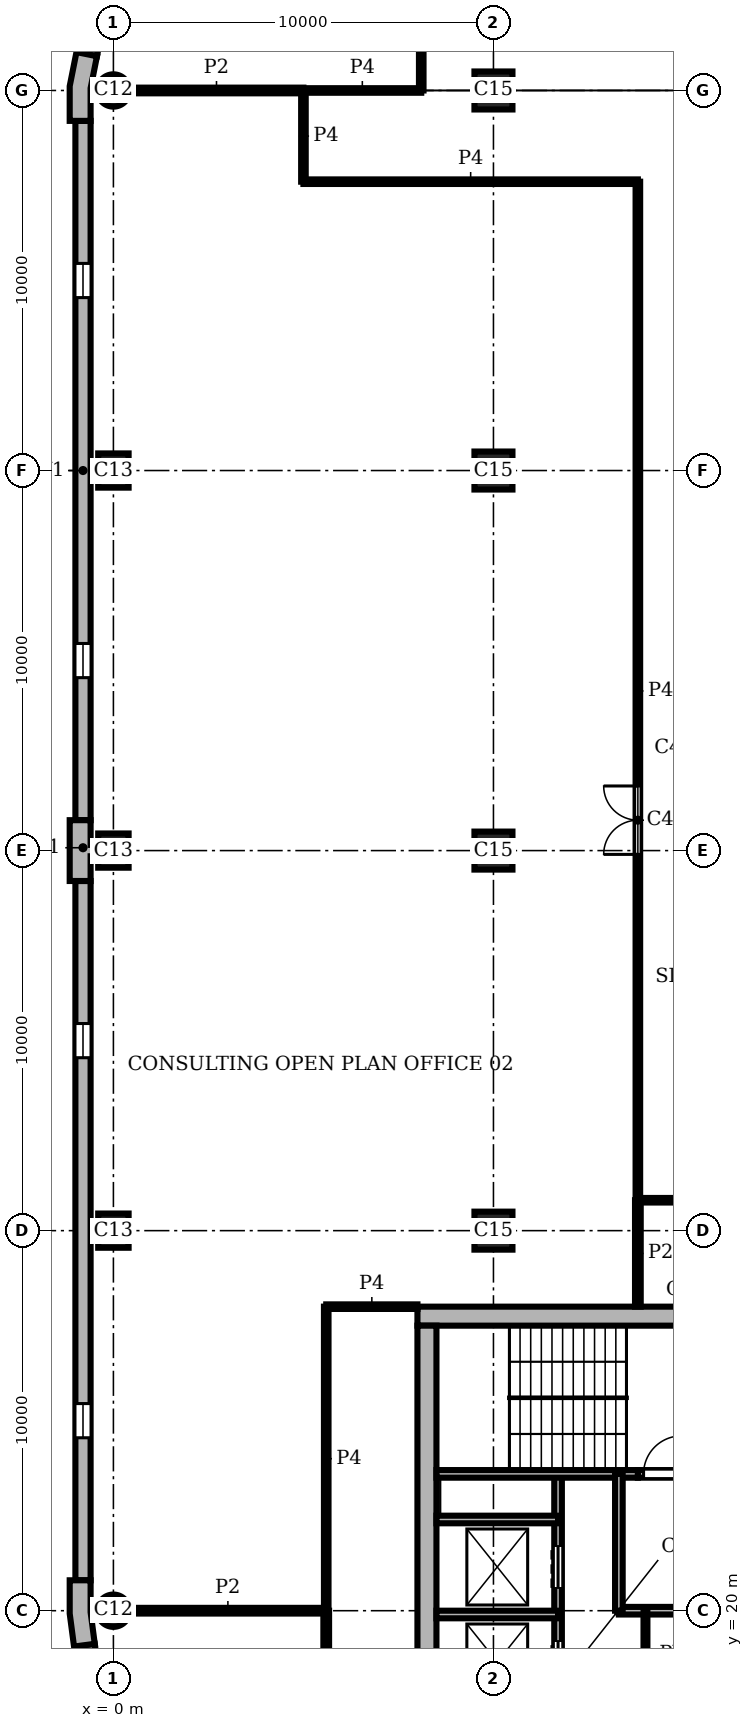
"""IFC4 building model, lengths in metres.
Left out: names, types, materials, properties, quantities, classifications, styles, units other than length and angle.
Written with IfcOpenShell. Run it as: python <this file> out.ifc"""

import sys

from ifc_helpers import new_model, si_unit, direction, frame, frame_2d, origin, origin_2d, place, context, subcontext, project, spatial, polyline, rectangle, circle, outline, extrude, element, fill, save


model = new_model("IFC4")
c1 = context("Model", 3, precision=1e-05, world=origin(), true_north=direction((0.0, 1.0)))
c2 = subcontext(c1, "Body", "Model", "MODEL_VIEW")
j1 = project(units=[si_unit("LENGTHUNIT", "METRE"), si_unit("PLANEANGLEUNIT", "RADIAN")], contexts=[c1])
p1 = place(None, origin())
s1 = spatial("IfcSite", under=j1, at=p1, CompositionType="ELEMENT")
p2 = place(p1, origin())
s2 = spatial("IfcBuilding", under=s1, at=p2, CompositionType="ELEMENT")
p3 = place(p2, frame((0.0, 0.0, 282.6)))
s3 = spatial("IfcBuildingStorey", under=s2, at=p3, CompositionType="ELEMENT", Elevation=282.6)
p4 = place(p3, frame((0.0, 60.0, 0.0), z_axis=(0.0, 0.0, 1.0), x_axis=(1.0, 0.0, 0.0)))
e1 = element("IfcColumn", 1, at=p4, inside=s3, PredefinedType="COLUMN", context=c2, shape_type="SweptSolid", body=[
    extrude(circle(Radius=0.425, at=origin_2d()), origin(), (0.0, 0.0, 1.0), 3.9),
])
for number, where, z_axis, x_axis in (
    (2, (0.0, 50.0, 0.0), (0.0, 0.0, 1.0), (0.0, 1.0, 0.0)),
    (3, (0.0, 40.0, 0.0), (0.0, 0.0, 1.0), (0.0, 1.0, 0.0)),
    (4, (0.0, 30.0, 0.0), (0.0, 0.0, 1.0), (0.0, 1.0, 0.0)),
):
    element("IfcColumn", number, at=place(p3, frame(where, z_axis=z_axis, x_axis=x_axis)), inside=s3, PredefinedType="COLUMN", context=c2, shape_type="SweptSolid", body=[
        extrude(rectangle(XDim=0.9, YDim=0.8, at=origin_2d()), origin(), (0.0, 0.0, 1.0), 3.9),
    ])
p5 = place(p3, frame((0.0, 20.0, 0.0), z_axis=(0.0, 0.0, 1.0), x_axis=(1.0, 0.0, 0.0)))
e5 = element("IfcColumn", 5, at=p5, inside=s3, PredefinedType="COLUMN", context=c2, shape_type="SweptSolid", body=[
    extrude(circle(Radius=0.425, at=origin_2d()), origin(), (0.0, 0.0, 1.0), 3.9),
])
for number, where, z_axis, x_axis in (
    (6, (10.0, 30.0, 0.0), (0.0, 0.0, 1.0), (1.0, 0.0, 0.0)),
    (7, (10.0, 40.0, 0.0), (0.0, 0.0, 1.0), (1.0, 0.0, 0.0)),
    (8, (10.0, 50.0, 0.0), (0.0, 0.0, 1.0), (1.0, 0.0, 0.0)),
    (9, (10.0, 60.0, 0.0), (0.0, 0.0, 1.0), (1.0, 0.0, 0.0)),
):
    element("IfcColumn", number, at=place(p3, frame(where, z_axis=z_axis, x_axis=x_axis)), inside=s3, PredefinedType="COLUMN", context=c2, shape_type="SweptSolid", body=[
        extrude(rectangle(XDim=1.0, YDim=1.0, at=origin_2d()), origin(), (0.0, 0.0, 1.0), 3.9),
    ])
p6 = place(p3, frame((28.0, 27.75, 0.0), z_axis=(0.0, 0.0, 1.0), x_axis=(-1.0, 0.0, 0.0)))
e10 = element("IfcWall", 10, at=p6, inside=s3, PredefinedType="SHEAR", context=c2, shape_type="SweptSolid", body=[
    extrude(rectangle(XDim=20.0, YDim=0.5, at=frame_2d((10.0, 0.0))), origin(), (0.0, 0.0, 1.0), 3.9),
])
p7 = place(p3, frame((8.25, 27.5, 0.0), z_axis=(0.0, 0.0, 1.0), x_axis=(0.0, -1.0, 0.0)))
e11 = element("IfcWall", 11, at=p7, inside=s3, PredefinedType="SHEAR", context=c2, shape_type="SweptSolid", body=[
    extrude(rectangle(XDim=19.0, YDim=0.5, at=frame_2d((9.5, 0.0))), origin(), (0.0, 0.0, 1.0), 3.9),
])
p8 = place(p3, origin())
e12 = element("IfcWall", 12, at=p8, inside=s3, PredefinedType="SOLIDWALL", context=c2, shape_type="SweptSolid", body=[
    extrude(outline(polyline([(-0.825, 60.98), (-0.972, 61.009), (-1.15, 60.113), (-1.15, 59.2), (-1.0, 59.2), (-0.6, 59.2), (-0.6, 60.059), (-0.432, 60.902), (-0.825, 60.98)])), origin(), (0.0, 0.0, 1.0), 3.9),
])
e13 = element("IfcWall", 13, at=p8, inside=s3, PredefinedType="SOLIDWALL", context=c2, shape_type="SweptSolid", body=[
    extrude(outline(polyline([(-0.6, 39.2), (-0.6, 39.85), (-0.45, 39.85), (-0.45, 40.15), (-0.6, 40.15), (-0.6, 40.8), (-1.0, 40.8), (-1.15, 40.8), (-1.15, 40.0), (-1.15, 39.2), (-1.0, 39.2), (-0.6, 39.2)])), origin(), (0.0, 0.0, 1.0), 3.9),
])
e14 = element("IfcWall", 14, at=p8, inside=s3, PredefinedType="SOLIDWALL", context=c2, shape_type="SweptSolid", body=[
    extrude(outline(polyline([(-1.0, 20.8), (-1.15, 20.8), (-1.15, 19.925), (-1.036, 19.057), (-0.887, 19.076), (-0.49, 19.128), (-0.6, 19.961), (-0.6, 20.8), (-1.0, 20.8)])), origin(), (0.0, 0.0, 1.0), 3.9),
])
p9 = place(p3, frame((0.299, 65.602, 0.0), z_axis=(0.0, 0.0, 1.0), x_axis=(-0.195098533057, -0.98078364709, 0.0)))
e15 = element("IfcWall", 15, at=p9, inside=s3, PredefinedType="SOLIDWALL", context=c2, shape_type="SweptSolid", body=[
    extrude(rectangle(XDim=4.753, YDim=0.4, at=frame_2d((2.376, 0.0))), origin(), (0.0, 0.0, 1.0), 3.9),
])
p10 = place(p9, frame((0.226, 0.0, 0.9)))
e16 = element("IfcOpeningElement", 16, at=p10, cuts=e15, PredefinedType="OPENING", context=c2, shape_type="SweptSolid", body=[
    extrude(rectangle(XDim=4.3, YDim=2.35, at=frame_2d((2.15, 1.175))), frame((0.0, 0.21, 0.0), z_axis=(0.0, -1.0, 0.0), x_axis=(1.0, 0.0, 0.0)), (0.0, 0.0, 1.0), 0.42),
])
p11 = place(p3, frame((-0.8, 59.2, 0.0), z_axis=(0.0, 0.0, 1.0), x_axis=(0.0, -1.0, 0.0)))
e17 = element("IfcWall", 17, at=p11, inside=s3, PredefinedType="SOLIDWALL", context=c2, shape_type="SweptSolid", body=[
    extrude(rectangle(XDim=18.4, YDim=0.4, at=frame_2d((9.2, 0.0))), origin(), (0.0, 0.0, 1.0), 3.9),
])
p12 = place(p11, frame((3.75, 0.0, 0.9)))
e18 = element("IfcOpeningElement", 18, at=p12, cuts=e17, PredefinedType="OPENING", context=c2, shape_type="SweptSolid", body=[
    extrude(rectangle(XDim=0.9, YDim=2.35, at=frame_2d((0.45, 1.175))), frame((0.0, 0.21, 0.0), z_axis=(0.0, -1.0, 0.0), x_axis=(1.0, 0.0, 0.0)), (0.0, 0.0, 1.0), 0.42),
])
p13 = place(p11, frame((13.75, 0.0, 0.9)))
e19 = element("IfcOpeningElement", 19, at=p13, cuts=e17, PredefinedType="OPENING", context=c2, shape_type="SweptSolid", body=[
    extrude(rectangle(XDim=0.9, YDim=2.35, at=frame_2d((0.45, 1.175))), frame((0.0, 0.21, 0.0), z_axis=(0.0, -1.0, 0.0), x_axis=(1.0, 0.0, 0.0)), (0.0, 0.0, 1.0), 0.42),
])
p14 = place(p3, frame((-0.8, 39.2, 0.0), z_axis=(0.0, 0.0, 1.0), x_axis=(0.0, -1.0, 0.0)))
e20 = element("IfcWall", 20, at=p14, inside=s3, PredefinedType="SOLIDWALL", context=c2, shape_type="SweptSolid", body=[
    extrude(rectangle(XDim=18.4, YDim=0.4, at=frame_2d((9.2, 0.0))), origin(), (0.0, 0.0, 1.0), 3.9),
])
p15 = place(p14, frame((3.75, 0.0, 0.9)))
e21 = element("IfcOpeningElement", 21, at=p15, cuts=e20, PredefinedType="OPENING", context=c2, shape_type="SweptSolid", body=[
    extrude(rectangle(XDim=0.9, YDim=2.35, at=frame_2d((0.45, 1.175))), frame((0.0, 0.21, 0.0), z_axis=(0.0, -1.0, 0.0), x_axis=(1.0, 0.0, 0.0)), (0.0, 0.0, 1.0), 0.42),
])
p16 = place(p14, frame((13.75, 0.0, 0.9)))
e22 = element("IfcOpeningElement", 22, at=p16, cuts=e20, PredefinedType="OPENING", context=c2, shape_type="SweptSolid", body=[
    extrude(rectangle(XDim=0.9, YDim=2.35, at=frame_2d((0.45, 1.175))), frame((0.0, 0.21, 0.0), z_axis=(0.0, -1.0, 0.0), x_axis=(1.0, 0.0, 0.0)), (0.0, 0.0, 1.0), 0.42),
])
p17 = place(p3, frame((-0.689, 19.102, 0.0), z_axis=(0.0, 0.0, 1.0), x_axis=(0.130514280502, -0.991446429508, 0.0)))
e23 = element("IfcWall", 23, at=p17, inside=s3, PredefinedType="SOLIDWALL", context=c2, shape_type="SweptSolid", body=[
    extrude(rectangle(XDim=4.121, YDim=0.4, at=frame_2d((2.061, 0.0))), origin(), (0.0, 0.0, 1.0), 3.9),
])
p18 = place(p17, frame((1.611, 0.0, 0.9)))
e24 = element("IfcOpeningElement", 24, at=p18, cuts=e23, PredefinedType="OPENING", context=c2, shape_type="SweptSolid", body=[
    extrude(rectangle(XDim=0.9, YDim=2.35, at=frame_2d((0.45, 1.175))), frame((0.0, 0.21, 0.0), z_axis=(0.0, -1.0, 0.0), x_axis=(1.0, 0.0, 0.0)), (0.0, 0.0, 1.0), 0.42),
])
p19 = place(p3, frame((8.5, 19.9, 0.0), z_axis=(0.0, 0.0, 1.0), x_axis=(1.0, 0.0, 0.0)))
e25 = element("IfcWall", 25, at=p19, inside=s3, PredefinedType="SHEAR", context=c2, shape_type="SweptSolid", body=[
    extrude(rectangle(XDim=3.2, YDim=0.2, at=frame_2d((1.6, 0.0))), origin(), (0.0, 0.0, 1.0), 3.58),
])
p20 = place(p3, frame((13.3, 20.0, 0.0), z_axis=(0.0, 0.0, 1.0), x_axis=(1.0, 0.0, 0.0)))
e26 = element("IfcWall", 26, at=p20, inside=s3, PredefinedType="SHEAR", context=c2, shape_type="SweptSolid", body=[
    extrude(rectangle(XDim=4.7, YDim=0.2, at=frame_2d((2.35, 0.0))), origin(), (0.0, 0.0, 1.0), 3.58),
])
p21 = place(p3, frame((8.5, 22.4, 0.0), z_axis=(0.0, 0.0, 1.0), x_axis=(1.0, 0.0, 0.0)))
e27 = element("IfcWall", 27, at=p21, inside=s3, PredefinedType="SHEAR", context=c2, shape_type="SweptSolid", body=[
    extrude(rectangle(XDim=3.2, YDim=0.2, at=frame_2d((1.6, 0.0))), origin(), (0.0, 0.0, 1.0), 3.58),
])
p22 = place(p3, frame((8.5, 23.6, 0.0), z_axis=(0.0, 0.0, 1.0), x_axis=(1.0, 0.0, 0.0)))
e28 = element("IfcWall", 28, at=p22, inside=s3, PredefinedType="SHEAR", context=c2, shape_type="SweptSolid", body=[
    extrude(rectangle(XDim=5.3, YDim=0.2, at=frame_2d((2.65, 0.0))), origin(), (0.0, 0.0, 1.0), 3.58),
])
p23 = place(p3, frame((13.8, 23.6, 0.0), z_axis=(0.0, 0.0, 1.0), x_axis=(1.0, 0.0, 0.0)))
e29 = element("IfcWall", 29, at=p23, inside=s3, PredefinedType="SHEAR", context=c2, shape_type="SweptSolid", body=[
    extrude(rectangle(XDim=13.7, YDim=0.2, at=frame_2d((6.85, 0.0))), origin(), (0.0, 0.0, 1.0), 3.58),
])
p24 = place(p23, frame((2.4, 0.0, 0.0)))
e30 = element("IfcOpeningElement", 30, at=p24, cuts=e29, PredefinedType="OPENING", context=c2, shape_type="SweptSolid", body=[
    extrude(rectangle(XDim=1.1, YDim=2.1, at=frame_2d((0.55, 1.05))), frame((0.0, 0.11, 0.0), z_axis=(0.0, -1.0, 0.0), x_axis=(1.0, 0.0, 0.0)), (0.0, 0.0, 1.0), 0.22),
])
p25 = place(p23, frame((4.9, 0.0, 0.0)))
e31 = element("IfcOpeningElement", 31, at=p25, cuts=e29, PredefinedType="OPENING", context=c2, shape_type="SweptSolid", body=[
    extrude(rectangle(XDim=1.1, YDim=2.1, at=frame_2d((0.55, 1.05))), frame((0.0, 0.11, 0.0), z_axis=(0.0, -1.0, 0.0), x_axis=(1.0, 0.0, 0.0)), (0.0, 0.0, 1.0), 0.22),
])
p26 = place(p23, frame((0.15, 0.0, 0.0)))
e32 = element("IfcOpeningElement", 32, at=p26, cuts=e29, PredefinedType="OPENING", context=c2, shape_type="SweptSolid", body=[
    extrude(rectangle(XDim=1.0, YDim=2.1, at=frame_2d((0.5, 1.05))), frame((0.0, 0.11, 0.0), z_axis=(0.0, -1.0, 0.0), x_axis=(1.0, 0.0, 0.0)), (0.0, 0.0, 1.0), 0.22),
])
p27 = place(p3, frame((11.7, 12.4, 0.0), z_axis=(0.0, 0.0, 1.0), x_axis=(0.0, 1.0, 0.0)))
e33 = element("IfcWall", 33, at=p27, inside=s3, PredefinedType="SHEAR", context=c2, shape_type="SweptSolid", body=[
    extrude(rectangle(XDim=11.2, YDim=0.2, at=frame_2d((5.6, 0.0))), origin(), (0.0, 0.0, 1.0), 3.58),
])
p28 = place(p27, frame((0.7, 0.0, 0.0)))
e34 = element("IfcOpeningElement", 34, at=p28, cuts=e33, PredefinedType="OPENING", context=c2, shape_type="SweptSolid", body=[
    extrude(rectangle(XDim=1.1, YDim=2.1, at=frame_2d((0.55, 1.05))), frame((0.0, 0.11, 0.0), z_axis=(0.0, -1.0, 0.0), x_axis=(1.0, 0.0, 0.0)), (0.0, 0.0, 1.0), 0.22),
])
p29 = place(p27, frame((3.2, 0.0, 0.0)))
e35 = element("IfcOpeningElement", 35, at=p29, cuts=e33, PredefinedType="OPENING", context=c2, shape_type="SweptSolid", body=[
    extrude(rectangle(XDim=1.1, YDim=2.1, at=frame_2d((0.55, 1.05))), frame((0.0, 0.11, 0.0), z_axis=(0.0, -1.0, 0.0), x_axis=(1.0, 0.0, 0.0)), (0.0, 0.0, 1.0), 0.22),
])
p30 = place(p27, frame((5.7, 0.0, 0.0)))
e36 = element("IfcOpeningElement", 36, at=p30, cuts=e33, PredefinedType="OPENING", context=c2, shape_type="SweptSolid", body=[
    extrude(rectangle(XDim=1.1, YDim=2.1, at=frame_2d((0.55, 1.05))), frame((0.0, 0.11, 0.0), z_axis=(0.0, -1.0, 0.0), x_axis=(1.0, 0.0, 0.0)), (0.0, 0.0, 1.0), 0.22),
])
p31 = place(p27, frame((8.2, 0.0, 0.0)))
e37 = element("IfcOpeningElement", 37, at=p31, cuts=e33, PredefinedType="OPENING", context=c2, shape_type="SweptSolid", body=[
    extrude(rectangle(XDim=1.1, YDim=2.1, at=frame_2d((0.55, 1.05))), frame((0.0, 0.11, 0.0), z_axis=(0.0, -1.0, 0.0), x_axis=(1.0, 0.0, 0.0)), (0.0, 0.0, 1.0), 0.22),
])
p32 = place(p3, frame((13.3, 20.0, 0.0), z_axis=(0.0, 0.0, 1.0), x_axis=(0.0, 1.0, 0.0)))
e38 = element("IfcWall", 38, at=p32, inside=s3, PredefinedType="SHEAR", context=c2, shape_type="SweptSolid", body=[
    extrude(rectangle(XDim=3.6, YDim=0.2, at=frame_2d((1.8, 0.0))), origin(), (0.0, 0.0, 1.0), 3.58),
])
p33 = place(p3, frame((14.0, 16.2, 0.0), z_axis=(0.0, 0.0, 1.0), x_axis=(0.0, 1.0, 0.0)))
e39 = element("IfcWall", 39, at=p33, inside=s3, PredefinedType="PARTITIONING", context=c2, shape_type="SweptSolid", body=[
    extrude(rectangle(XDim=3.8, YDim=0.1, at=frame_2d((1.9, 0.0))), origin(), (0.0, 0.0, 1.0), 3.58),
])
p34 = place(p3, frame((5.6, 5.6, 0.0), z_axis=(0.0, 0.0, 1.0), x_axis=(0.0, 1.0, 0.0)))
e40 = element("IfcWall", 40, at=p34, inside=s3, PredefinedType="PARTITIONING", context=c2, shape_type="SweptSolid", body=[
    extrude(rectangle(XDim=14.4, YDim=0.15, at=frame_2d((7.2, 0.0))), origin(), (0.0, 0.0, 1.0), 3.58),
])
p35 = place(p34, frame((3.6, 0.0, 0.0)))
e41 = element("IfcOpeningElement", 41, at=p35, cuts=e40, PredefinedType="OPENING", context=c2, shape_type="SweptSolid", body=[
    extrude(rectangle(XDim=1.0, YDim=2.1, at=frame_2d((0.5, 1.05))), frame((0.0, 0.085, 0.0), z_axis=(0.0, -1.0, 0.0), x_axis=(1.0, 0.0, 0.0)), (0.0, 0.0, 1.0), 0.17),
])
p36 = place(p34, frame((11.25, 0.0, 0.0)))
e42 = element("IfcOpeningElement", 42, at=p36, cuts=e40, PredefinedType="OPENING", context=c2, shape_type="SweptSolid", body=[
    extrude(rectangle(XDim=0.8, YDim=2.1, at=frame_2d((0.4, 1.05))), frame((0.0, 0.085, 0.0), z_axis=(0.0, -1.0, 0.0), x_axis=(1.0, 0.0, 0.0)), (0.0, 0.0, 1.0), 0.17),
])
p37 = place(p3, frame((13.8, 28.0, 0.0), z_axis=(0.0, 0.0, 1.0), x_axis=(0.0, 1.0, 0.0)))
e43 = element("IfcWall", 43, at=p37, inside=s3, PredefinedType="PARTITIONING", context=c2, shape_type="SweptSolid", body=[
    extrude(rectangle(XDim=2.801, YDim=0.15, at=frame_2d((1.4, 0.0))), origin(), (0.0, 0.0, 1.0), 3.58),
])
p38 = place(p3, frame((0.425, 20.0, 0.0), z_axis=(0.0, 0.0, 1.0), x_axis=(1.0, 0.0, 0.0)))
e44 = element("IfcWall", 44, at=p38, inside=s3, PredefinedType="PARTITIONING", context=c2, shape_type="SweptSolid", body=[
    extrude(rectangle(XDim=5.175, YDim=0.15, at=frame_2d((2.587, 0.0))), origin(), (0.0, 0.0, 1.0), 3.58),
])
p39 = place(p3, frame((0.425, 60.0, 0.0), z_axis=(0.0, 0.0, 1.0), x_axis=(1.0, 0.0, 0.0)))
e45 = element("IfcWall", 45, at=p39, inside=s3, PredefinedType="PARTITIONING", context=c2, shape_type="SweptSolid", body=[
    extrude(rectangle(XDim=4.575, YDim=0.15, at=frame_2d((2.288, 0.0))), origin(), (0.0, 0.0, 1.0), 3.58),
])
p40 = place(p3, frame((5.0, 57.6, 0.0), z_axis=(0.0, 0.0, 1.0), x_axis=(0.0, 1.0, 0.0)))
e46 = element("IfcWall", 46, at=p40, inside=s3, PredefinedType="PARTITIONING", context=c2, shape_type="SweptSolid", body=[
    extrude(rectangle(XDim=2.4, YDim=0.12, at=frame_2d((1.2, 0.0))), origin(), (0.0, 0.0, 1.0), 3.58),
])
p41 = place(p3, frame((5.6, 20.0, 0.0), z_axis=(0.0, 0.0, 1.0), x_axis=(0.0, 1.0, 0.0)))
e47 = element("IfcWall", 47, at=p41, inside=s3, PredefinedType="PARTITIONING", context=c2, shape_type="SweptSolid", body=[
    extrude(rectangle(XDim=8.0, YDim=0.12, at=frame_2d((4.0, 0.0))), origin(), (0.0, 0.0, 1.0), 3.58),
])
p42 = place(p3, frame((8.1, 60.0, 0.0), z_axis=(0.0, 0.0, 1.0), x_axis=(0.0, 1.0, 0.0)))
e48 = element("IfcWall", 48, at=p42, inside=s3, PredefinedType="PARTITIONING", context=c2, shape_type="SweptSolid", body=[
    extrude(rectangle(XDim=6.4, YDim=0.12, at=frame_2d((3.2, 0.0))), origin(), (0.0, 0.0, 1.0), 3.58),
])
p43 = place(p42, frame((2.6, 0.0, 0.0)))
e49 = element("IfcOpeningElement", 49, at=p43, cuts=e48, PredefinedType="OPENING", context=c2, shape_type="SweptSolid", body=[
    extrude(rectangle(XDim=1.8, YDim=2.1, at=frame_2d((0.9, 1.05))), frame((0.0, 0.07, 0.0), z_axis=(0.0, -1.0, 0.0), x_axis=(1.0, 0.0, 0.0)), (0.0, 0.0, 1.0), 0.14),
])
p44 = place(p3, frame((13.8, 30.8, 0.0), z_axis=(0.0, 0.0, 1.0), x_axis=(0.0, 1.0, 0.0)))
e50 = element("IfcWall", 50, at=p44, inside=s3, PredefinedType="PARTITIONING", context=c2, shape_type="SweptSolid", body=[
    extrude(rectangle(XDim=26.8, YDim=0.12, at=frame_2d((13.4, 0.0))), origin(), (0.0, 0.0, 1.0), 3.58),
])
p45 = place(p44, frame((9.1, 0.0, 0.0)))
e51 = element("IfcOpeningElement", 51, at=p45, cuts=e50, PredefinedType="OPENING", context=c2, shape_type="SweptSolid", body=[
    extrude(rectangle(XDim=1.8, YDim=2.1, at=frame_2d((0.9, 1.05))), frame((0.0, 0.07, 0.0), z_axis=(0.0, -1.0, 0.0), x_axis=(1.0, 0.0, 0.0)), (0.0, 0.0, 1.0), 0.14),
])
p46 = place(p3, frame((5.6, 28.0, 0.0), z_axis=(0.0, 0.0, 1.0), x_axis=(1.0, 0.0, 0.0)))
e52 = element("IfcWall", 52, at=p46, inside=s3, PredefinedType="PARTITIONING", context=c2, shape_type="SweptSolid", body=[
    extrude(rectangle(XDim=2.4, YDim=0.12, at=frame_2d((1.2, 0.0))), origin(), (0.0, 0.0, 1.0), 3.58),
])
p47 = place(p3, frame((13.802, 30.8, 0.0), z_axis=(0.0, 0.0, 1.0), x_axis=(1.0, 0.0, 0.0)))
e53 = element("IfcWall", 53, at=p47, inside=s3, PredefinedType="PARTITIONING", context=c2, shape_type="SweptSolid", body=[
    extrude(rectangle(XDim=16.798, YDim=0.12, at=frame_2d((8.399, 0.0))), origin(), (0.0, 0.0, 1.0), 3.58),
])
p48 = place(p47, frame((9.1, 0.0, 0.0)))
e54 = element("IfcOpeningElement", 54, at=p48, cuts=e53, PredefinedType="OPENING", context=c2, shape_type="SweptSolid", body=[
    extrude(rectangle(XDim=1.0, YDim=2.1, at=frame_2d((0.5, 1.05))), frame((0.0, 0.07, 0.0), z_axis=(0.0, -1.0, 0.0), x_axis=(1.0, 0.0, 0.0)), (0.0, 0.0, 1.0), 0.14),
])
p49 = place(p3, frame((5.0, 57.6, 0.0), z_axis=(0.0, 0.0, 1.0), x_axis=(1.0, 0.0, 0.0)))
e55 = element("IfcWall", 55, at=p49, inside=s3, PredefinedType="PARTITIONING", context=c2, shape_type="SweptSolid", body=[
    extrude(rectangle(XDim=8.8, YDim=0.12, at=frame_2d((4.4, 0.0))), origin(), (0.0, 0.0, 1.0), 3.58),
])
p50 = place(p3, frame((5.0, 60.0, 0.0), z_axis=(0.0, 0.0, 1.0), x_axis=(1.0, 0.0, 0.0)))
e56 = element("IfcWall", 56, at=p50, inside=s3, PredefinedType="PARTITIONING", context=c2, shape_type="SweptSolid", body=[
    extrude(rectangle(XDim=3.1, YDim=0.12, at=frame_2d((1.55, 0.0))), origin(), (0.0, 0.0, 1.0), 3.58),
])
p51 = place(p12, origin())
e57 = element("IfcWindow", 57, at=p51, inside=s3, PartitioningType="SINGLE_PANEL", PredefinedType="WINDOW", context=c2, shape_type="SweptSolid", body=[
    extrude(rectangle(XDim=0.9, YDim=2.35, at=frame_2d((0.45, 1.175))), frame((0.0, 0.16, 0.0), z_axis=(0.0, -1.0, 0.0), x_axis=(1.0, 0.0, 0.0)), (0.0, 0.0, 1.0), 0.06),
])
fill(e18, e57)
p52 = place(p13, origin())
e58 = element("IfcWindow", 58, at=p52, inside=s3, PartitioningType="SINGLE_PANEL", PredefinedType="WINDOW", context=c2, shape_type="SweptSolid", body=[
    extrude(rectangle(XDim=0.9, YDim=2.35, at=frame_2d((0.45, 1.175))), frame((0.0, 0.16, 0.0), z_axis=(0.0, -1.0, 0.0), x_axis=(1.0, 0.0, 0.0)), (0.0, 0.0, 1.0), 0.06),
])
fill(e19, e58)
p53 = place(p15, origin())
e59 = element("IfcWindow", 59, at=p53, inside=s3, PartitioningType="SINGLE_PANEL", PredefinedType="WINDOW", context=c2, shape_type="SweptSolid", body=[
    extrude(rectangle(XDim=0.9, YDim=2.35, at=frame_2d((0.45, 1.175))), frame((0.0, 0.16, 0.0), z_axis=(0.0, -1.0, 0.0), x_axis=(1.0, 0.0, 0.0)), (0.0, 0.0, 1.0), 0.06),
])
fill(e21, e59)
p54 = place(p16, origin())
e60 = element("IfcWindow", 60, at=p54, inside=s3, PartitioningType="SINGLE_PANEL", PredefinedType="WINDOW", context=c2, shape_type="SweptSolid", body=[
    extrude(rectangle(XDim=0.9, YDim=2.35, at=frame_2d((0.45, 1.175))), frame((0.0, 0.16, 0.0), z_axis=(0.0, -1.0, 0.0), x_axis=(1.0, 0.0, 0.0)), (0.0, 0.0, 1.0), 0.06),
])
fill(e22, e60)
p55 = place(p30, origin())
e61 = element("IfcDoor", 61, at=p55, inside=s3, OperationType="DOUBLE_DOOR_SLIDING", PredefinedType="DOOR", context=c2, shape_type="SweptSolid", body=[
    extrude(rectangle(XDim=1.1, YDim=2.1, at=frame_2d((0.55, 1.05))), frame((0.0, 0.025, 0.0), z_axis=(0.0, -1.0, 0.0), x_axis=(1.0, 0.0, 0.0)), (0.0, 0.0, 1.0), 0.05),
])
fill(e36, e61)
p56 = place(p31, origin())
e62 = element("IfcDoor", 62, at=p56, inside=s3, OperationType="DOUBLE_DOOR_SLIDING", PredefinedType="DOOR", context=c2, shape_type="SweptSolid", body=[
    extrude(rectangle(XDim=1.1, YDim=2.1, at=frame_2d((0.55, 1.05))), frame((0.0, 0.025, 0.0), z_axis=(0.0, -1.0, 0.0), x_axis=(1.0, 0.0, 0.0)), (0.0, 0.0, 1.0), 0.05),
])
fill(e37, e62)
p57 = place(p26, origin())
e63 = element("IfcDoor", 63, at=p57, inside=s3, OperationType="SINGLE_SWING_RIGHT", PredefinedType="DOOR", context=c2, shape_type="SweptSolid", body=[
    extrude(rectangle(XDim=1.0, YDim=2.1, at=frame_2d((0.5, 1.05))), frame((0.0, 0.025, 0.0), z_axis=(0.0, -1.0, 0.0), x_axis=(1.0, 0.0, 0.0)), (0.0, 0.0, 1.0), 0.05),
])
fill(e32, e63)
p58 = place(p45, origin())
e64 = element("IfcDoor", 64, at=p58, inside=s3, OperationType="DOUBLE_DOOR_SINGLE_SWING", PredefinedType="DOOR", context=c2, shape_type="SweptSolid", body=[
    extrude(rectangle(XDim=1.8, YDim=2.1, at=frame_2d((0.9, 1.05))), frame((0.0, 0.025, 0.0), z_axis=(0.0, -1.0, 0.0), x_axis=(1.0, 0.0, 0.0)), (0.0, 0.0, 1.0), 0.05),
])
fill(e51, e64)
save(model, sys.argv[1])
